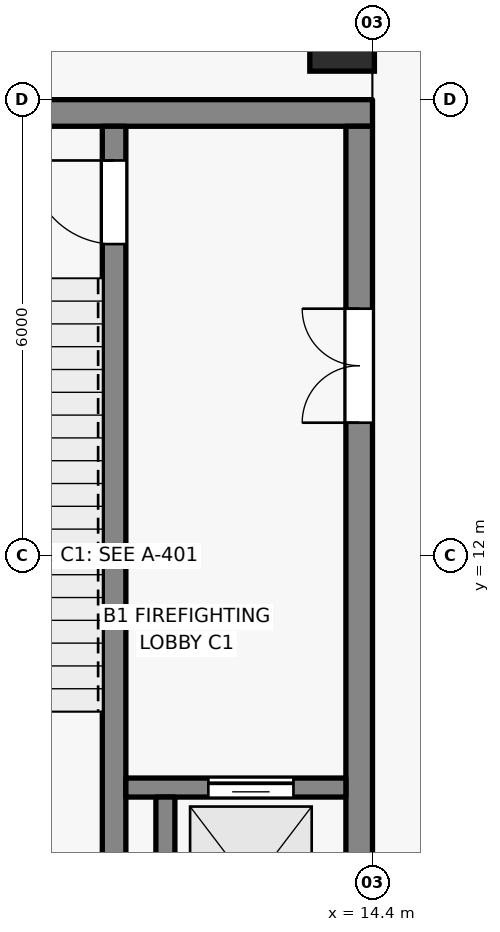
"""IFC4 building model, lengths in metres.
Left out: names, types, materials, properties, quantities, classifications, styles, units other than length and angle.
Written with IfcOpenShell. Run it as: python <this file> out.ifc"""

import sys

from ifc_helpers import new_model, si_unit, direction, frame, frame_2d, origin, origin_2d, place, context, subcontext, project, spatial, rectangle, extrude, element, fill, save


model = new_model("IFC4")
c1 = context("Model", 3, precision=1e-05, world=origin(), true_north=direction((0.0, 1.0)))
c2 = subcontext(c1, "Body", "Model", "MODEL_VIEW")
j1 = project(units=[si_unit("LENGTHUNIT", "METRE"), si_unit("PLANEANGLEUNIT", "RADIAN")], contexts=[c1])
p1 = place(None, origin())
s1 = spatial("IfcSite", under=j1, at=p1, CompositionType="ELEMENT")
p2 = place(p1, origin())
s2 = spatial("IfcBuilding", under=s1, at=p2, CompositionType="ELEMENT")
p3 = place(p2, frame((0.0, 0.0, -7.2)))
s3 = spatial("IfcBuildingStorey", under=s2, at=p3, CompositionType="ELEMENT", Elevation=-7.2)
p4 = place(p3, frame((7.2, 17.825, 0.0), z_axis=(0.0, 0.0, 1.0), x_axis=(1.0, 0.0, 0.0)))
e1 = element("IfcWall", 1, at=p4, inside=s3, PredefinedType="SHEAR", context=c2, shape_type="SweptSolid", body=[
    extrude(rectangle(XDim=7.2, YDim=0.35, at=frame_2d((3.6, 0.0))), origin(), (0.0, 0.0, 1.0), 6.8),
])
p5 = place(p3, frame((14.225, 6.35, 0.0), z_axis=(0.0, 0.0, 1.0), x_axis=(0.0, 1.0, 0.0)))
e2 = element("IfcWall", 2, at=p5, inside=s3, PredefinedType="SHEAR", context=c2, shape_type="SweptSolid", body=[
    extrude(rectangle(XDim=11.3, YDim=0.35, at=frame_2d((5.65, 0.0))), origin(), (0.0, 0.0, 1.0), 6.8),
])
p6 = place(p5, frame((7.4, 0.0, 0.0)))
e3 = element("IfcOpeningElement", 3, at=p6, cuts=e2, PredefinedType="OPENING", context=c2, shape_type="SweptSolid", body=[
    extrude(rectangle(XDim=1.5, YDim=2.15, at=frame_2d((0.75, 1.075))), frame((0.0, 0.185, 0.0), z_axis=(0.0, -1.0, 0.0), x_axis=(1.0, 0.0, 0.0)), (0.0, 0.0, 1.0), 0.37),
])
p7 = place(p3, frame((11.0, 6.35, 0.0), z_axis=(0.0, 0.0, 1.0), x_axis=(0.0, 1.0, 0.0)))
e4 = element("IfcWall", 4, at=p7, inside=s3, PredefinedType="SHEAR", context=c2, shape_type="SweptSolid", body=[
    extrude(rectangle(XDim=11.3, YDim=0.31, at=frame_2d((5.65, 0.0))), origin(), (0.0, 0.0, 1.0), 6.8),
])
p8 = place(p7, frame((9.75, 0.0, 0.0)))
e5 = element("IfcOpeningElement", 5, at=p8, cuts=e4, PredefinedType="OPENING", context=c2, shape_type="SweptSolid", body=[
    extrude(rectangle(XDim=1.1, YDim=2.15, at=frame_2d((0.55, 1.075))), frame((0.0, 0.165, 0.0), z_axis=(0.0, -1.0, 0.0), x_axis=(1.0, 0.0, 0.0)), (0.0, 0.0, 1.0), 0.33),
])
p9 = place(p3, frame((14.0, 18.8, 0.0), z_axis=(0.0, 0.0, 1.0), x_axis=(1.0, 0.0, 0.0)))
e6 = element("IfcColumn", 6, at=p9, inside=s3, PredefinedType="COLUMN", context=c2, shape_type="SweptSolid", body=[
    extrude(rectangle(XDim=0.85, YDim=0.85, at=origin_2d()), origin(), (0.0, 0.0, 1.0), 7.2),
])
p10 = place(p3, frame((11.155, 8.95, 0.0), z_axis=(0.0, 0.0, 1.0), x_axis=(1.0, 0.0, 0.0)))
e7 = element("IfcWall", 7, at=p10, inside=s3, PredefinedType="SHEAR", context=c2, shape_type="SweptSolid", body=[
    extrude(rectangle(XDim=2.895, YDim=0.25, at=frame_2d((1.448, 0.0))), origin(), (0.0, 0.0, 1.0), 6.8),
])
p11 = place(p10, frame((1.085, 0.0, 0.0)))
e8 = element("IfcOpeningElement", 8, at=p11, cuts=e7, PredefinedType="OPENING", context=c2, shape_type="SweptSolid", body=[
    extrude(rectangle(XDim=1.12, YDim=2.15, at=frame_2d((0.56, 1.075))), frame((0.0, 0.135, 0.0), z_axis=(0.0, -1.0, 0.0), x_axis=(1.0, 0.0, 0.0)), (0.0, 0.0, 1.0), 0.27),
])
p12 = place(p3, frame((11.675, 6.35, 0.0), z_axis=(0.0, 0.0, 1.0), x_axis=(0.0, 1.0, 0.0)))
e9 = element("IfcWall", 9, at=p12, inside=s3, PredefinedType="SHEAR", context=c2, shape_type="SweptSolid", body=[
    extrude(rectangle(XDim=2.475, YDim=0.25, at=frame_2d((1.237, 0.0))), origin(), (0.0, 0.0, 1.0), 6.8),
])
p13 = place(p11, origin())
e10 = element("IfcDoor", 10, at=p13, inside=s3, OperationType="SLIDING_TO_LEFT", PredefinedType="DOOR", context=c2, shape_type="SweptSolid", body=[
    extrude(rectangle(XDim=1.12, YDim=2.15, at=frame_2d((0.56, 1.075))), frame((0.0, 0.025, 0.0), z_axis=(0.0, -1.0, 0.0), x_axis=(1.0, 0.0, 0.0)), (0.0, 0.0, 1.0), 0.05),
])
fill(e8, e10)
p14 = place(p6, origin())
e11 = element("IfcDoor", 11, at=p14, inside=s3, OperationType="DOUBLE_DOOR_SINGLE_SWING", PredefinedType="DOOR", context=c2, shape_type="SweptSolid", body=[
    extrude(rectangle(XDim=1.5, YDim=2.15, at=frame_2d((0.75, 1.075))), frame((0.0, 0.025, 0.0), z_axis=(0.0, -1.0, 0.0), x_axis=(1.0, 0.0, 0.0)), (0.0, 0.0, 1.0), 0.05),
])
fill(e3, e11)
p15 = place(p8, origin())
e12 = element("IfcDoor", 12, at=p15, inside=s3, OperationType="SINGLE_SWING_RIGHT", PredefinedType="DOOR", context=c2, shape_type="SweptSolid", body=[
    extrude(rectangle(XDim=1.1, YDim=2.15, at=frame_2d((0.55, 1.075))), frame((0.0, 0.025, 0.0), z_axis=(0.0, -1.0, 0.0), x_axis=(1.0, 0.0, 0.0)), (0.0, 0.0, 1.0), 0.05),
])
fill(e5, e12)
save(model, sys.argv[1])
